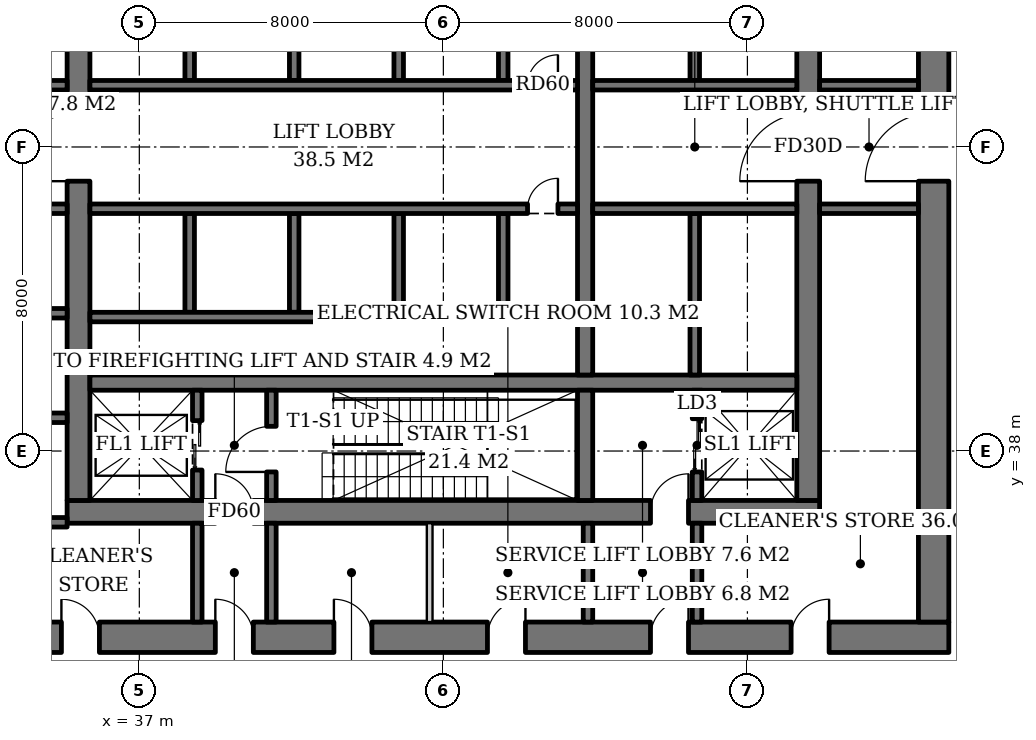
"""IFC4 building model, lengths in metres.
Left out: names, types, materials, properties, quantities, classifications, styles, units other than length and angle.
Written with IfcOpenShell. Run it as: python <this file> out.ifc"""

import sys

from ifc_helpers import new_model, si_unit, direction, frame, frame_2d, origin, place, context, subcontext, project, spatial, rectangle, extrude, element, fill, save


model = new_model("IFC4")
c1 = context("Model", 3, precision=1e-05, world=origin(), true_north=direction((0.0, 1.0)))
c2 = subcontext(c1, "Body", "Model", "MODEL_VIEW")
j1 = project(units=[si_unit("LENGTHUNIT", "METRE"), si_unit("PLANEANGLEUNIT", "RADIAN")], contexts=[c1])
p1 = place(None, origin())
s1 = spatial("IfcSite", under=j1, at=p1, CompositionType="ELEMENT")
p2 = place(p1, origin())
s2 = spatial("IfcBuilding", under=s1, at=p2, CompositionType="ELEMENT")
p3 = place(p2, frame((0.0, 0.0, -5.0)))
s3 = spatial("IfcBuildingStorey", under=s2, at=p3, CompositionType="ELEMENT", Elevation=-5.0)
p4 = place(p3, frame((35.1, 36.4, 0.0), z_axis=(0.0, 0.0, 1.0), x_axis=(1.0, 0.0, 0.0)))
e1 = element("IfcWall", 1, at=p4, inside=s3, PredefinedType="SHEAR", context=c2, shape_type="SweptSolid", body=[
    extrude(rectangle(XDim=19.8, YDim=0.6, at=frame_2d((9.9, 0.0))), origin(), (0.0, 0.0, 1.0), 5.0),
])
p5 = place(p4, frame((3.9, 0.0, 0.0)))
e2 = element("IfcOpeningElement", 2, at=p5, cuts=e1, PredefinedType="OPENING", context=c2, shape_type="SweptSolid", body=[
    extrude(rectangle(XDim=1.0, YDim=2.1, at=frame_2d((0.5, 1.05))), frame((0.0, 0.31, 0.0), z_axis=(0.0, -1.0, 0.0), x_axis=(1.0, 0.0, 0.0)), (0.0, 0.0, 1.0), 0.62),
])
p6 = place(p4, frame((15.35, 0.0, 0.0)))
e3 = element("IfcOpeningElement", 3, at=p6, cuts=e1, PredefinedType="OPENING", context=c2, shape_type="SweptSolid", body=[
    extrude(rectangle(XDim=1.0, YDim=2.1, at=frame_2d((0.5, 1.05))), frame((0.0, 0.31, 0.0), z_axis=(0.0, -1.0, 0.0), x_axis=(1.0, 0.0, 0.0)), (0.0, 0.0, 1.0), 0.62),
])
p7 = place(p3, frame((35.4, 36.7, 0.0), z_axis=(0.0, 0.0, 1.0), x_axis=(0.0, 1.0, 0.0)))
e4 = element("IfcWall", 4, at=p7, inside=s3, PredefinedType="SHEAR", context=c2, shape_type="SweptSolid", body=[
    extrude(rectangle(XDim=18.6, YDim=0.6, at=frame_2d((9.3, 0.0))), origin(), (0.0, 0.0, 1.0), 5.0),
])
p8 = place(p7, frame((8.4, 0.0, 0.0)))
e5 = element("IfcOpeningElement", 5, at=p8, cuts=e4, PredefinedType="OPENING", context=c2, shape_type="SweptSolid", body=[
    extrude(rectangle(XDim=1.8, YDim=2.4, at=frame_2d((0.9, 1.2))), frame((0.0, 0.31, 0.0), z_axis=(0.0, -1.0, 0.0), x_axis=(1.0, 0.0, 0.0)), (0.0, 0.0, 1.0), 0.62),
])
p9 = place(p3, frame((54.6, 36.7, 0.0), z_axis=(0.0, 0.0, 1.0), x_axis=(0.0, 1.0, 0.0)))
e6 = element("IfcWall", 6, at=p9, inside=s3, PredefinedType="SHEAR", context=c2, shape_type="SweptSolid", body=[
    extrude(rectangle(XDim=18.6, YDim=0.6, at=frame_2d((9.3, 0.0))), origin(), (0.0, 0.0, 1.0), 5.0),
])
p10 = place(p9, frame((8.4, 0.0, 0.0)))
e7 = element("IfcOpeningElement", 7, at=p10, cuts=e6, PredefinedType="OPENING", context=c2, shape_type="SweptSolid", body=[
    extrude(rectangle(XDim=1.8, YDim=2.4, at=frame_2d((0.9, 1.2))), frame((0.0, 0.31, 0.0), z_axis=(0.0, -1.0, 0.0), x_axis=(1.0, 0.0, 0.0)), (0.0, 0.0, 1.0), 0.62),
])
p11 = place(p3, frame((31.7, 33.1, 0.0), z_axis=(0.0, 0.0, 1.0), x_axis=(1.0, 0.0, 0.0)))
e8 = element("IfcWall", 8, at=p11, inside=s3, PredefinedType="SHEAR", context=c2, shape_type="SweptSolid", body=[
    extrude(rectangle(XDim=26.6, YDim=0.8, at=frame_2d((13.3, 0.0))), origin(), (0.0, 0.0, 1.0), 5.0),
])
p12 = place(p11, frame((7.3, 0.0, 0.0)))
e9 = element("IfcOpeningElement", 9, at=p12, cuts=e8, PredefinedType="OPENING", context=c2, shape_type="SweptSolid", body=[
    extrude(rectangle(XDim=1.0, YDim=2.1, at=frame_2d((0.5, 1.05))), frame((0.0, 0.41, 0.0), z_axis=(0.0, -1.0, 0.0), x_axis=(1.0, 0.0, 0.0)), (0.0, 0.0, 1.0), 0.82),
])
p13 = place(p11, frame((18.75, 0.0, 0.0)))
e10 = element("IfcOpeningElement", 10, at=p13, cuts=e8, PredefinedType="OPENING", context=c2, shape_type="SweptSolid", body=[
    extrude(rectangle(XDim=1.0, YDim=2.1, at=frame_2d((0.5, 1.05))), frame((0.0, 0.41, 0.0), z_axis=(0.0, -1.0, 0.0), x_axis=(1.0, 0.0, 0.0)), (0.0, 0.0, 1.0), 0.82),
])
p14 = place(p11, frame((3.25, 0.0, 0.0)))
e11 = element("IfcOpeningElement", 11, at=p14, cuts=e8, PredefinedType="OPENING", context=c2, shape_type="SweptSolid", body=[
    extrude(rectangle(XDim=1.0, YDim=2.1, at=frame_2d((0.5, 1.05))), frame((0.0, 0.41, 0.0), z_axis=(0.0, -1.0, 0.0), x_axis=(1.0, 0.0, 0.0)), (0.0, 0.0, 1.0), 0.82),
])
p15 = place(p11, frame((10.42, 0.0, 0.0)))
e12 = element("IfcOpeningElement", 12, at=p15, cuts=e8, PredefinedType="OPENING", context=c2, shape_type="SweptSolid", body=[
    extrude(rectangle(XDim=1.0, YDim=2.1, at=frame_2d((0.5, 1.05))), frame((0.0, 0.41, 0.0), z_axis=(0.0, -1.0, 0.0), x_axis=(1.0, 0.0, 0.0)), (0.0, 0.0, 1.0), 0.82),
])
p16 = place(p11, frame((14.46, 0.0, 0.0)))
e13 = element("IfcOpeningElement", 13, at=p16, cuts=e8, PredefinedType="OPENING", context=c2, shape_type="SweptSolid", body=[
    extrude(rectangle(XDim=1.0, YDim=2.1, at=frame_2d((0.5, 1.05))), frame((0.0, 0.41, 0.0), z_axis=(0.0, -1.0, 0.0), x_axis=(1.0, 0.0, 0.0)), (0.0, 0.0, 1.0), 0.82),
])
p17 = place(p11, frame((22.45, 0.0, 0.0)))
e14 = element("IfcOpeningElement", 14, at=p17, cuts=e8, PredefinedType="OPENING", context=c2, shape_type="SweptSolid", body=[
    extrude(rectangle(XDim=1.0, YDim=2.1, at=frame_2d((0.5, 1.05))), frame((0.0, 0.41, 0.0), z_axis=(0.0, -1.0, 0.0), x_axis=(1.0, 0.0, 0.0)), (0.0, 0.0, 1.0), 0.82),
])
p18 = place(p3, frame((57.9, 33.5, 0.0), z_axis=(0.0, 0.0, 1.0), x_axis=(0.0, 1.0, 0.0)))
e15 = element("IfcWall", 15, at=p18, inside=s3, PredefinedType="SHEAR", context=c2, shape_type="SweptSolid", body=[
    extrude(rectangle(XDim=25.0, YDim=0.8, at=frame_2d((12.5, 0.0))), origin(), (0.0, 0.0, 1.0), 5.0),
])
p19 = place(p18, frame((11.6, 0.0, 0.0)))
e16 = element("IfcOpeningElement", 16, at=p19, cuts=e15, PredefinedType="OPENING", context=c2, shape_type="SweptSolid", body=[
    extrude(rectangle(XDim=1.8, YDim=2.4, at=frame_2d((0.9, 1.2))), frame((0.0, 0.41, 0.0), z_axis=(0.0, -1.0, 0.0), x_axis=(1.0, 0.0, 0.0)), (0.0, 0.0, 1.0), 0.82),
])
p20 = place(p3, frame((35.7, 39.8, 0.0), z_axis=(0.0, 0.0, 1.0), x_axis=(1.0, 0.0, 0.0)))
e17 = element("IfcWall", 17, at=p20, inside=s3, PredefinedType="SHEAR", context=c2, shape_type="SweptSolid", body=[
    extrude(rectangle(XDim=18.6, YDim=0.4, at=frame_2d((9.3, 0.0))), origin(), (0.0, 0.0, 1.0), 5.0),
])
p21 = place(p3, frame((48.73, 36.7, 0.0), z_axis=(0.0, 0.0, 1.0), x_axis=(0.0, 1.0, 0.0)))
e18 = element("IfcWall", 18, at=p21, inside=s3, PredefinedType="SHEAR", context=c2, shape_type="SweptSolid", body=[
    extrude(rectangle(XDim=2.9, YDim=0.4, at=frame_2d((1.45, 0.0))), origin(), (0.0, 0.0, 1.0), 5.0),
])
p22 = place(p3, frame((48.73, 40.0, 0.0), z_axis=(0.0, 0.0, 1.0), x_axis=(0.0, 1.0, 0.0)))
e19 = element("IfcWall", 19, at=p22, inside=s3, PredefinedType="SHEAR", context=c2, shape_type="SweptSolid", body=[
    extrude(rectangle(XDim=12.0, YDim=0.4, at=frame_2d((6.0, 0.0))), origin(), (0.0, 0.0, 1.0), 5.0),
])
p23 = place(p3, frame((38.525, 36.7, 0.0), z_axis=(0.0, 0.0, 1.0), x_axis=(0.0, 1.0, 0.0)))
e20 = element("IfcWall", 20, at=p23, inside=s3, PredefinedType="SHEAR", context=c2, shape_type="SweptSolid", body=[
    extrude(rectangle(XDim=2.9, YDim=0.25, at=frame_2d((1.45, 0.0))), origin(), (0.0, 0.0, 1.0), 5.0),
])
p24 = place(p23, frame((0.8, 0.0, 0.0)))
e21 = element("IfcOpeningElement", 21, at=p24, cuts=e20, PredefinedType="OPENING", context=c2, shape_type="SweptSolid", body=[
    extrude(rectangle(XDim=1.3, YDim=2.2, at=frame_2d((0.65, 1.1))), frame((0.0, 0.135, 0.0), z_axis=(0.0, -1.0, 0.0), x_axis=(1.0, 0.0, 0.0)), (0.0, 0.0, 1.0), 0.27),
])
p25 = place(p3, frame((40.475, 36.7, 0.0), z_axis=(0.0, 0.0, 1.0), x_axis=(0.0, 1.0, 0.0)))
e22 = element("IfcWall", 22, at=p25, inside=s3, PredefinedType="SHEAR", context=c2, shape_type="SweptSolid", body=[
    extrude(rectangle(XDim=2.9, YDim=0.25, at=frame_2d((1.45, 0.0))), origin(), (0.0, 0.0, 1.0), 5.0),
])
p26 = place(p25, frame((0.75, 0.0, 0.0)))
e23 = element("IfcOpeningElement", 23, at=p26, cuts=e22, PredefinedType="OPENING", context=c2, shape_type="SweptSolid", body=[
    extrude(rectangle(XDim=1.2, YDim=2.1, at=frame_2d((0.6, 1.05))), frame((0.0, 0.135, 0.0), z_axis=(0.0, -1.0, 0.0), x_axis=(1.0, 0.0, 0.0)), (0.0, 0.0, 1.0), 0.27),
])
p27 = place(p3, frame((51.675, 36.7, 0.0), z_axis=(0.0, 0.0, 1.0), x_axis=(0.0, 1.0, 0.0)))
e24 = element("IfcWall", 24, at=p27, inside=s3, PredefinedType="SHEAR", context=c2, shape_type="SweptSolid", body=[
    extrude(rectangle(XDim=2.9, YDim=0.25, at=frame_2d((1.45, 0.0))), origin(), (0.0, 0.0, 1.0), 5.0),
])
p28 = place(p27, frame((0.75, 0.0, 0.0)))
e25 = element("IfcOpeningElement", 25, at=p28, cuts=e24, PredefinedType="OPENING", context=c2, shape_type="SweptSolid", body=[
    extrude(rectangle(XDim=1.4, YDim=2.4, at=frame_2d((0.7, 1.2))), frame((0.0, 0.135, 0.0), z_axis=(0.0, -1.0, 0.0), x_axis=(1.0, 0.0, 0.0)), (0.0, 0.0, 1.0), 0.27),
])
for number, where, z_axis, x_axis in (
    (26, (38.325, 47.75, 0.0), (0.0, 0.0, 1.0), (0.0, 1.0, 0.0)),
    (27, (41.075, 47.75, 0.0), (0.0, 0.0, 1.0), (0.0, 1.0, 0.0)),
    (28, (43.825, 47.75, 0.0), (0.0, 0.0, 1.0), (0.0, 1.0, 0.0)),
    (29, (46.575, 47.75, 0.0), (0.0, 0.0, 1.0), (0.0, 1.0, 0.0)),
):
    element("IfcWall", number, at=place(p3, frame(where, z_axis=z_axis, x_axis=x_axis)), inside=s3, PredefinedType="SHEAR", context=c2, shape_type="SweptSolid", body=[
        extrude(rectangle(XDim=2.6, YDim=0.25, at=frame_2d((1.3, 0.0))), origin(), (0.0, 0.0, 1.0), 5.0),
    ])
p29 = place(p3, frame((35.7, 47.625, 0.0), z_axis=(0.0, 0.0, 1.0), x_axis=(1.0, 0.0, 0.0)))
e30 = element("IfcWall", 30, at=p29, inside=s3, PredefinedType="SHEAR", context=c2, shape_type="SweptSolid", body=[
    extrude(rectangle(XDim=12.83, YDim=0.25, at=frame_2d((6.415, 0.0))), origin(), (0.0, 0.0, 1.0), 5.0),
])
p30 = place(p29, frame((11.515, 0.0, 0.0)))
e31 = element("IfcOpeningElement", 31, at=p30, cuts=e30, PredefinedType="OPENING", context=c2, shape_type="SweptSolid", body=[
    extrude(rectangle(XDim=0.8, YDim=2.0, at=frame_2d((0.4, 1.0))), frame((0.0, 0.135, 0.0), z_axis=(0.0, -1.0, 0.0), x_axis=(1.0, 0.0, 0.0)), (0.0, 0.0, 1.0), 0.27),
])
for number, where, z_axis, x_axis in (
    (32, (38.325, 44.25, 0.0), (0.0, 0.0, 1.0), (0.0, -1.0, 0.0)),
    (33, (41.075, 44.25, 0.0), (0.0, 0.0, 1.0), (0.0, -1.0, 0.0)),
    (34, (43.825, 44.25, 0.0), (0.0, 0.0, 1.0), (0.0, -1.0, 0.0)),
    (35, (46.575, 44.25, 0.0), (0.0, 0.0, 1.0), (0.0, -1.0, 0.0)),
):
    element("IfcWall", number, at=place(p3, frame(where, z_axis=z_axis, x_axis=x_axis)), inside=s3, PredefinedType="SHEAR", context=c2, shape_type="SweptSolid", body=[
        extrude(rectangle(XDim=2.6, YDim=0.25, at=frame_2d((1.3, 0.0))), origin(), (0.0, 0.0, 1.0), 5.0),
    ])
p31 = place(p3, frame((35.7, 41.525, 0.0), z_axis=(0.0, 0.0, 1.0), x_axis=(1.0, 0.0, 0.0)))
e36 = element("IfcWall", 36, at=p31, inside=s3, PredefinedType="SHEAR", context=c2, shape_type="SweptSolid", body=[
    extrude(rectangle(XDim=11.0, YDim=0.25, at=frame_2d((5.5, 0.0))), origin(), (0.0, 0.0, 1.0), 5.0),
])
p32 = place(p3, frame((35.7, 44.375, 0.0), z_axis=(0.0, 0.0, 1.0), x_axis=(1.0, 0.0, 0.0)))
e37 = element("IfcWall", 37, at=p32, inside=s3, PredefinedType="SHEAR", context=c2, shape_type="SweptSolid", body=[
    extrude(rectangle(XDim=12.83, YDim=0.25, at=frame_2d((6.415, 0.0))), origin(), (0.0, 0.0, 1.0), 5.0),
])
p33 = place(p32, frame((11.515, 0.0, 0.0)))
e38 = element("IfcOpeningElement", 38, at=p33, cuts=e37, PredefinedType="OPENING", context=c2, shape_type="SweptSolid", body=[
    extrude(rectangle(XDim=0.8, YDim=2.0, at=frame_2d((0.4, 1.0))), frame((0.0, 0.135, 0.0), z_axis=(0.0, -1.0, 0.0), x_axis=(1.0, 0.0, 0.0)), (0.0, 0.0, 1.0), 0.27),
])
p34 = place(p3, frame((51.615, 47.75, 0.0), z_axis=(0.0, 0.0, 1.0), x_axis=(0.0, 1.0, 0.0)))
e39 = element("IfcWall", 39, at=p34, inside=s3, PredefinedType="SHEAR", context=c2, shape_type="SweptSolid", body=[
    extrude(rectangle(XDim=4.25, YDim=0.25, at=frame_2d((2.125, 0.0))), origin(), (0.0, 0.0, 1.0), 5.0),
])
p35 = place(p3, frame((48.93, 47.625, 0.0), z_axis=(0.0, 0.0, 1.0), x_axis=(1.0, 0.0, 0.0)))
e40 = element("IfcWall", 40, at=p35, inside=s3, PredefinedType="SHEAR", context=c2, shape_type="SweptSolid", body=[
    extrude(rectangle(XDim=5.37, YDim=0.25, at=frame_2d((2.685, 0.0))), origin(), (0.0, 0.0, 1.0), 5.0),
])
p36 = place(p3, frame((51.615, 44.25, 0.0), z_axis=(0.0, 0.0, 1.0), x_axis=(0.0, -1.0, 0.0)))
e41 = element("IfcWall", 41, at=p36, inside=s3, PredefinedType="SHEAR", context=c2, shape_type="SweptSolid", body=[
    extrude(rectangle(XDim=4.25, YDim=0.25, at=frame_2d((2.125, 0.0))), origin(), (0.0, 0.0, 1.0), 5.0),
])
p37 = place(p3, frame((48.93, 44.375, 0.0), z_axis=(0.0, 0.0, 1.0), x_axis=(1.0, 0.0, 0.0)))
e42 = element("IfcWall", 42, at=p37, inside=s3, PredefinedType="SHEAR", context=c2, shape_type="SweptSolid", body=[
    extrude(rectangle(XDim=5.37, YDim=0.25, at=frame_2d((2.685, 0.0))), origin(), (0.0, 0.0, 1.0), 5.0),
])
for number, where, z_axis, x_axis in (
    (43, (32.5, 36.125, 0.0), (0.0, 0.0, 1.0), (1.0, 0.0, 0.0)),
    (44, (32.5, 38.875, 0.0), (0.0, 0.0, 1.0), (1.0, 0.0, 0.0)),
    (45, (32.5, 41.625, 0.0), (0.0, 0.0, 1.0), (1.0, 0.0, 0.0)),
    (46, (32.5, 44.375, 0.0), (0.0, 0.0, 1.0), (1.0, 0.0, 0.0)),
    (47, (32.5, 47.625, 0.0), (0.0, 0.0, 1.0), (1.0, 0.0, 0.0)),
):
    element("IfcWall", number, at=place(p3, frame(where, z_axis=z_axis, x_axis=x_axis)), inside=s3, PredefinedType="SHEAR", context=c2, shape_type="SweptSolid", body=[
        extrude(rectangle(XDim=2.6, YDim=0.25, at=frame_2d((1.3, 0.0))), origin(), (0.0, 0.0, 1.0), 5.0),
    ])
for number, where, z_axis, x_axis in (
    (48, (38.525, 33.5, 0.0), (0.0, 0.0, 1.0), (0.0, 1.0, 0.0)),
    (49, (40.475, 33.5, 0.0), (0.0, 0.0, 1.0), (0.0, 1.0, 0.0)),
    (50, (54.9, 44.375, 0.0), (0.0, 0.0, 1.0), (1.0, 0.0, 0.0)),
    (51, (54.9, 47.625, 0.0), (0.0, 0.0, 1.0), (1.0, 0.0, 0.0)),
    (52, (48.805, 33.5, 0.0), (0.0, 0.0, 1.0), (0.0, 1.0, 0.0)),
    (53, (51.675, 33.5, 0.0), (0.0, 0.0, 1.0), (0.0, 1.0, 0.0)),
):
    element("IfcWall", number, at=place(p3, frame(where, z_axis=z_axis, x_axis=x_axis)), inside=s3, PredefinedType="SOLIDWALL", context=c2, shape_type="SweptSolid", body=[
        extrude(rectangle(XDim=2.6, YDim=0.25, at=frame_2d((1.3, 0.0))), origin(), (0.0, 0.0, 1.0), 4.7),
    ])
p38 = place(p3, frame((44.64, 33.5, 0.0), z_axis=(0.0, 0.0, 1.0), x_axis=(0.0, 1.0, 0.0)))
e54 = element("IfcWall", 54, at=p38, inside=s3, PredefinedType="SOLIDWALL", context=c2, shape_type="SweptSolid", body=[
    extrude(rectangle(XDim=2.6, YDim=0.15, at=frame_2d((1.3, 0.0))), origin(), (0.0, 0.0, 1.0), 4.7),
])
p39 = place(p24, origin())
e55 = element("IfcDoor", 55, at=p39, inside=s3, OperationType="DOUBLE_DOOR_SLIDING", PredefinedType="DOOR", context=c2, shape_type="SweptSolid", body=[
    extrude(rectangle(XDim=1.3, YDim=2.2, at=frame_2d((0.65, 1.1))), frame((0.0, 0.025, 0.0), z_axis=(0.0, -1.0, 0.0), x_axis=(1.0, 0.0, 0.0)), (0.0, 0.0, 1.0), 0.05),
])
fill(e21, e55)
p40 = place(p26, origin())
e56 = element("IfcDoor", 56, at=p40, inside=s3, OperationType="SINGLE_SWING_LEFT", PredefinedType="DOOR", context=c2, shape_type="SweptSolid", body=[
    extrude(rectangle(XDim=1.2, YDim=2.1, at=frame_2d((0.6, 1.05))), frame((0.0, 0.025, 0.0), z_axis=(0.0, -1.0, 0.0), x_axis=(1.0, 0.0, 0.0)), (0.0, 0.0, 1.0), 0.05),
])
fill(e23, e56)
p41 = place(p28, origin())
e57 = element("IfcDoor", 57, at=p41, inside=s3, OperationType="DOUBLE_DOOR_SLIDING", PredefinedType="DOOR", context=c2, shape_type="SweptSolid", body=[
    extrude(rectangle(XDim=1.4, YDim=2.4, at=frame_2d((0.7, 1.2))), frame((0.0, 0.025, 0.0), z_axis=(0.0, -1.0, 0.0), x_axis=(1.0, 0.0, 0.0)), (0.0, 0.0, 1.0), 0.05),
])
fill(e25, e57)
p42 = place(p30, origin())
e58 = element("IfcDoor", 58, at=p42, inside=s3, OperationType="SINGLE_SWING_RIGHT", PredefinedType="DOOR", context=c2, shape_type="SweptSolid", body=[
    extrude(rectangle(XDim=0.8, YDim=2.0, at=frame_2d((0.4, 1.0))), frame((0.0, 0.025, 0.0), z_axis=(0.0, -1.0, 0.0), x_axis=(1.0, 0.0, 0.0)), (0.0, 0.0, 1.0), 0.05),
])
fill(e31, e58)
p43 = place(p33, origin())
e59 = element("IfcDoor", 59, at=p43, inside=s3, OperationType="SINGLE_SWING_RIGHT", PredefinedType="DOOR", context=c2, shape_type="SweptSolid", body=[
    extrude(rectangle(XDim=0.8, YDim=2.0, at=frame_2d((0.4, 1.0))), frame((0.0, 0.025, 0.0), z_axis=(0.0, -1.0, 0.0), x_axis=(1.0, 0.0, 0.0)), (0.0, 0.0, 1.0), 0.05),
])
fill(e38, e59)
p44 = place(p5, origin())
e60 = element("IfcDoor", 60, at=p44, inside=s3, OperationType="SINGLE_SWING_LEFT", PredefinedType="DOOR", context=c2, shape_type="SweptSolid", body=[
    extrude(rectangle(XDim=1.0, YDim=2.1, at=frame_2d((0.5, 1.05))), frame((0.0, 0.025, 0.0), z_axis=(0.0, -1.0, 0.0), x_axis=(1.0, 0.0, 0.0)), (0.0, 0.0, 1.0), 0.05),
])
fill(e2, e60)
p45 = place(p8, origin())
e61 = element("IfcDoor", 61, at=p45, inside=s3, OperationType="DOUBLE_DOOR_SINGLE_SWING", PredefinedType="DOOR", context=c2, shape_type="SweptSolid", body=[
    extrude(rectangle(XDim=1.8, YDim=2.4, at=frame_2d((0.9, 1.2))), frame((0.0, 0.025, 0.0), z_axis=(0.0, -1.0, 0.0), x_axis=(1.0, 0.0, 0.0)), (0.0, 0.0, 1.0), 0.05),
])
fill(e5, e61)
p46 = place(p10, origin())
e62 = element("IfcDoor", 62, at=p46, inside=s3, OperationType="DOUBLE_DOOR_SINGLE_SWING", PredefinedType="DOOR", context=c2, shape_type="SweptSolid", body=[
    extrude(rectangle(XDim=1.8, YDim=2.4, at=frame_2d((0.9, 1.2))), frame((0.0, 0.025, 0.0), z_axis=(0.0, -1.0, 0.0), x_axis=(1.0, 0.0, 0.0)), (0.0, 0.0, 1.0), 0.05),
])
fill(e7, e62)
p47 = place(p6, origin())
e63 = element("IfcDoor", 63, at=p47, inside=s3, OperationType="SINGLE_SWING_RIGHT", PredefinedType="DOOR", context=c2, shape_type="SweptSolid", body=[
    extrude(rectangle(XDim=1.0, YDim=2.1, at=frame_2d((0.5, 1.05))), frame((0.0, 0.025, 0.0), z_axis=(0.0, -1.0, 0.0), x_axis=(1.0, 0.0, 0.0)), (0.0, 0.0, 1.0), 0.05),
])
fill(e3, e63)
p48 = place(p19, origin())
e64 = element("IfcDoor", 64, at=p48, inside=s3, OperationType="DOUBLE_DOOR_SINGLE_SWING", PredefinedType="DOOR", context=c2, shape_type="SweptSolid", body=[
    extrude(rectangle(XDim=1.8, YDim=2.4, at=frame_2d((0.9, 1.2))), frame((0.0, 0.025, 0.0), z_axis=(0.0, -1.0, 0.0), x_axis=(1.0, 0.0, 0.0)), (0.0, 0.0, 1.0), 0.05),
])
fill(e16, e64)
p49 = place(p12, origin())
e65 = element("IfcDoor", 65, at=p49, inside=s3, OperationType="SINGLE_SWING_LEFT", PredefinedType="DOOR", context=c2, shape_type="SweptSolid", body=[
    extrude(rectangle(XDim=1.0, YDim=2.1, at=frame_2d((0.5, 1.05))), frame((0.0, 0.025, 0.0), z_axis=(0.0, -1.0, 0.0), x_axis=(1.0, 0.0, 0.0)), (0.0, 0.0, 1.0), 0.05),
])
fill(e9, e65)
p50 = place(p13, origin())
e66 = element("IfcDoor", 66, at=p50, inside=s3, OperationType="SINGLE_SWING_RIGHT", PredefinedType="DOOR", context=c2, shape_type="SweptSolid", body=[
    extrude(rectangle(XDim=1.0, YDim=2.1, at=frame_2d((0.5, 1.05))), frame((0.0, 0.025, 0.0), z_axis=(0.0, -1.0, 0.0), x_axis=(1.0, 0.0, 0.0)), (0.0, 0.0, 1.0), 0.05),
])
fill(e10, e66)
p51 = place(p14, origin())
e67 = element("IfcDoor", 67, at=p51, inside=s3, OperationType="SINGLE_SWING_LEFT", PredefinedType="DOOR", context=c2, shape_type="SweptSolid", body=[
    extrude(rectangle(XDim=1.0, YDim=2.1, at=frame_2d((0.5, 1.05))), frame((0.0, 0.39, 0.0), z_axis=(0.0, -1.0, 0.0), x_axis=(1.0, 0.0, 0.0)), (0.0, 0.0, 1.0), 0.05),
])
fill(e11, e67)
p52 = place(p15, origin())
e68 = element("IfcDoor", 68, at=p52, inside=s3, OperationType="SINGLE_SWING_LEFT", PredefinedType="DOOR", context=c2, shape_type="SweptSolid", body=[
    extrude(rectangle(XDim=1.0, YDim=2.1, at=frame_2d((0.5, 1.05))), frame((0.0, 0.39, 0.0), z_axis=(0.0, -1.0, 0.0), x_axis=(1.0, 0.0, 0.0)), (0.0, 0.0, 1.0), 0.05),
])
fill(e12, e68)
p53 = place(p16, origin())
e69 = element("IfcDoor", 69, at=p53, inside=s3, OperationType="SINGLE_SWING_RIGHT", PredefinedType="DOOR", context=c2, shape_type="SweptSolid", body=[
    extrude(rectangle(XDim=1.0, YDim=2.1, at=frame_2d((0.5, 1.05))), frame((0.0, 0.39, 0.0), z_axis=(0.0, -1.0, 0.0), x_axis=(1.0, 0.0, 0.0)), (0.0, 0.0, 1.0), 0.05),
])
fill(e13, e69)
p54 = place(p17, origin())
e70 = element("IfcDoor", 70, at=p54, inside=s3, OperationType="SINGLE_SWING_RIGHT", PredefinedType="DOOR", context=c2, shape_type="SweptSolid", body=[
    extrude(rectangle(XDim=1.0, YDim=2.1, at=frame_2d((0.5, 1.05))), frame((0.0, 0.39, 0.0), z_axis=(0.0, -1.0, 0.0), x_axis=(1.0, 0.0, 0.0)), (0.0, 0.0, 1.0), 0.05),
])
fill(e14, e70)
save(model, sys.argv[1])
